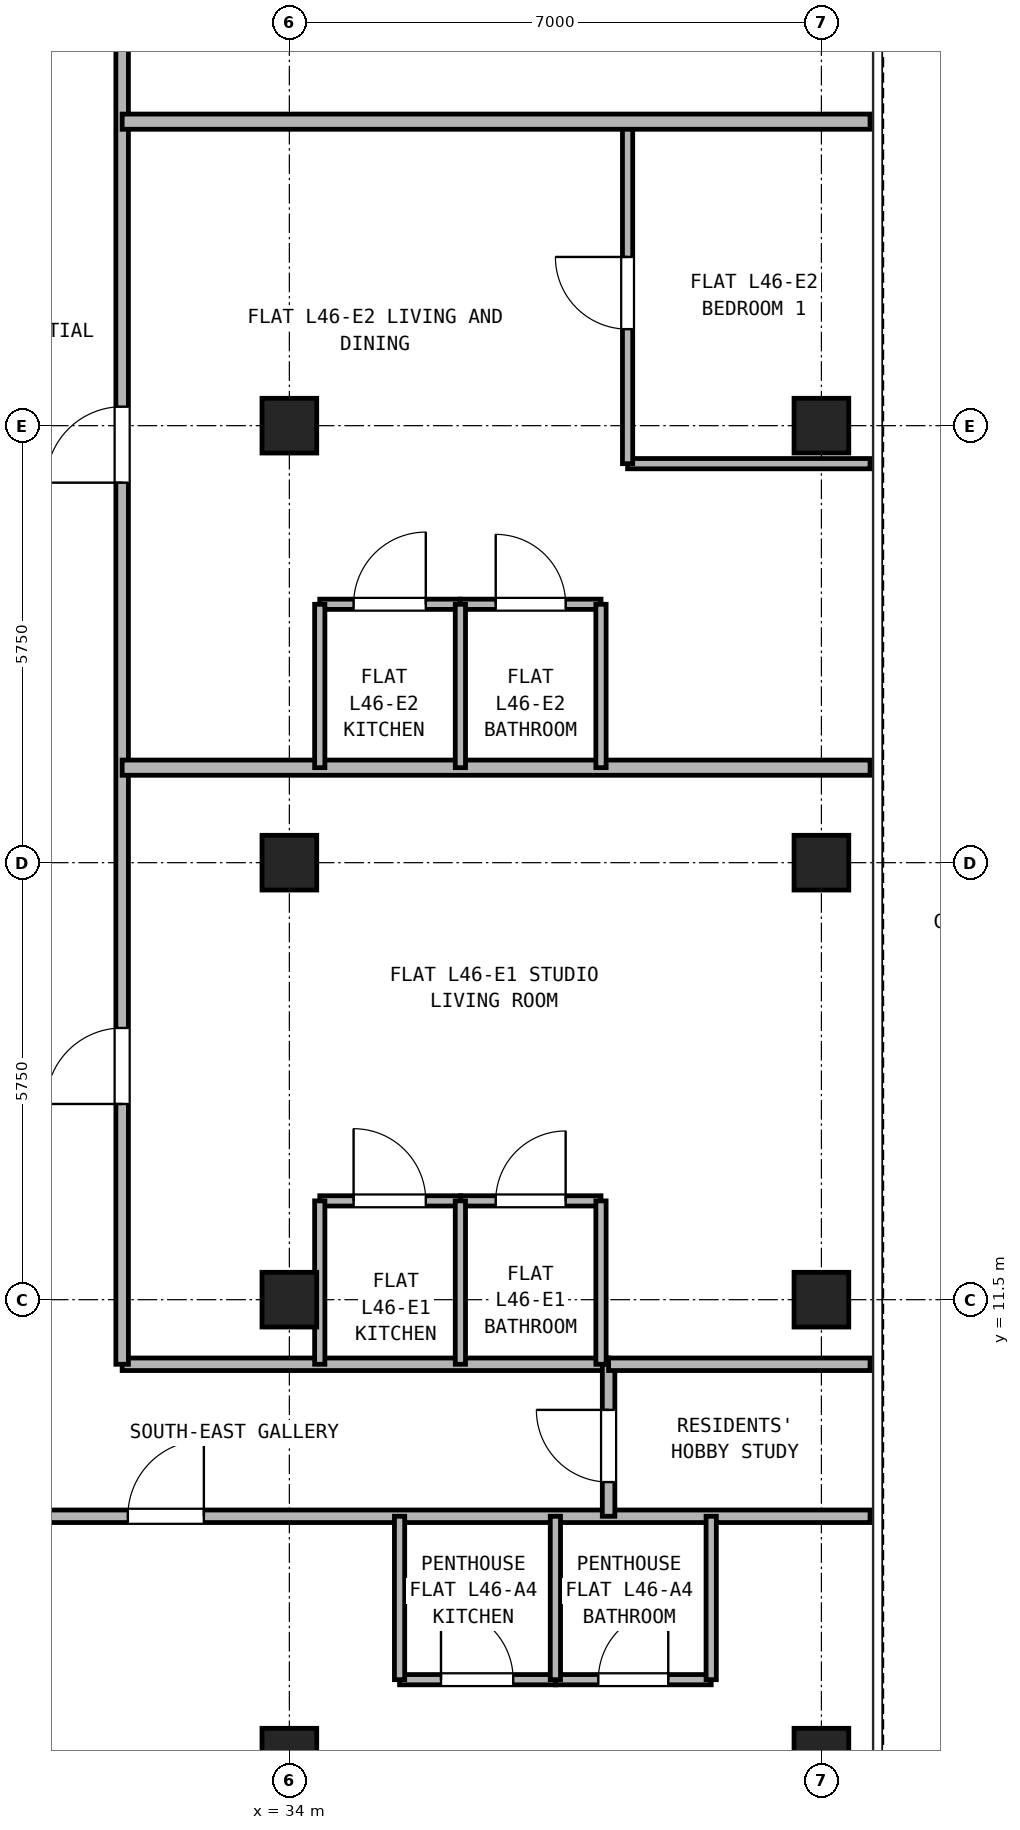
"""IFC4 building model, lengths in metres.
Left out: names, types, materials, properties, quantities, classifications, styles, units other than length and angle.
Written with IfcOpenShell. Run it as: python <this file> out.ifc"""

import sys

from ifc_helpers import new_model, si_unit, direction, frame, frame_2d, origin, origin_2d, place, context, subcontext, project, spatial, rectangle, hollow_rectangle, extrude, source, transform, mapped, element, fill, save


model = new_model("IFC4")
c1 = context("Model", 3, precision=1e-05, world=origin(), true_north=direction((0.0, 1.0)))
c2 = subcontext(c1, "Body", "Model", "MODEL_VIEW")
j1 = project(units=[si_unit("LENGTHUNIT", "METRE"), si_unit("PLANEANGLEUNIT", "RADIAN")], contexts=[c1])
p1 = place(None, origin())
s1 = spatial("IfcSite", under=j1, at=p1, CompositionType="ELEMENT")
p2 = place(p1, origin())
s2 = spatial("IfcBuilding", under=s1, at=p2, CompositionType="ELEMENT")
p3 = place(p2, frame((0.0, 0.0, 165.7)))
s3 = spatial("IfcBuildingStorey", under=s2, at=p3, CompositionType="ELEMENT", Elevation=165.7)
m1 = source(origin(), c2, "Body", "SweptSolid", [
    extrude(hollow_rectangle(XDim=0.72, YDim=0.72, WallThickness=0.04, at=origin_2d()), origin(), (0.0, 0.0, 1.0), 2.95),
])
for number, where, z_axis, x_axis in (
    (1, (41.0, 5.5, 0.0), (0.0, 0.0, 1.0), (1.0, 0.0, 0.0)),
    (2, (41.0, 11.5, 0.0), (0.0, 0.0, 1.0), (1.0, 0.0, 0.0)),
    (3, (41.0, 17.25, 0.0), (0.0, 0.0, 1.0), (1.0, 0.0, 0.0)),
    (4, (41.0, 23.0, 0.0), (0.0, 0.0, 1.0), (1.0, 0.0, 0.0)),
    (5, (34.0, 5.5, 0.0), (0.0, 0.0, 1.0), (1.0, 0.0, 0.0)),
    (6, (34.0, 11.5, 0.0), (0.0, 0.0, 1.0), (1.0, 0.0, 0.0)),
    (7, (34.0, 17.25, 0.0), (0.0, 0.0, 1.0), (1.0, 0.0, 0.0)),
    (8, (34.0, 23.0, 0.0), (0.0, 0.0, 1.0), (1.0, 0.0, 0.0)),
):
    element("IfcColumn", number, at=place(p3, frame(where, z_axis=z_axis, x_axis=x_axis)), inside=s3, PredefinedType="COLUMN", context=c2, shape_type="MappedRepresentation", body=[
        mapped(m1, transform((0.0, 0.0, 0.0), x_axis=(1.0, 0.0, 0.0), y_axis=(0.0, 1.0, 0.0), z_axis=(0.0, 0.0, 1.0), scale=1.0)),
    ])
p4 = place(p3, frame((0.16, 8.65, 0.0), z_axis=(0.0, 0.0, 1.0), x_axis=(1.0, 0.0, 0.0)))
e9 = element("IfcWall", 9, at=p4, inside=s3, PredefinedType="PARTITIONING", context=c2, shape_type="SweptSolid", body=[
    extrude(rectangle(XDim=41.48, YDim=0.165, at=frame_2d((20.74, 0.0))), origin(), (0.0, 0.0, 1.0), 2.583),
])
p5 = place(p4, frame((9.39, 0.0, 0.0)))
e10 = element("IfcOpeningElement", 10, at=p5, cuts=e9, PredefinedType="OPENING", context=c2, shape_type="SweptSolid", body=[
    extrude(rectangle(XDim=1.0, YDim=2.15, at=frame_2d((0.5, 1.075))), frame((0.0, 0.093, 0.0), z_axis=(0.0, -1.0, 0.0), x_axis=(1.0, 0.0, 0.0)), (0.0, 0.0, 1.0), 0.185),
])
p6 = place(p4, frame((18.965, 0.0, 0.0)))
e11 = element("IfcOpeningElement", 11, at=p6, cuts=e9, PredefinedType="OPENING", context=c2, shape_type="SweptSolid", body=[
    extrude(rectangle(XDim=1.0, YDim=2.15, at=frame_2d((0.5, 1.075))), frame((0.0, 0.093, 0.0), z_axis=(0.0, -1.0, 0.0), x_axis=(1.0, 0.0, 0.0)), (0.0, 0.0, 1.0), 0.185),
])
p7 = place(p4, frame((26.34, 0.0, 0.0)))
e12 = element("IfcOpeningElement", 12, at=p7, cuts=e9, PredefinedType="OPENING", context=c2, shape_type="SweptSolid", body=[
    extrude(rectangle(XDim=1.0, YDim=2.15, at=frame_2d((0.5, 1.075))), frame((0.0, 0.093, 0.0), z_axis=(0.0, -1.0, 0.0), x_axis=(1.0, 0.0, 0.0)), (0.0, 0.0, 1.0), 0.185),
])
p8 = place(p4, frame((31.715, 0.0, 0.0)))
e13 = element("IfcOpeningElement", 13, at=p8, cuts=e9, PredefinedType="OPENING", context=c2, shape_type="SweptSolid", body=[
    extrude(rectangle(XDim=1.0, YDim=2.15, at=frame_2d((0.5, 1.075))), frame((0.0, 0.093, 0.0), z_axis=(0.0, -1.0, 0.0), x_axis=(1.0, 0.0, 0.0)), (0.0, 0.0, 1.0), 0.185),
])
p9 = place(p3, frame((31.8, 10.65, 0.0), z_axis=(0.0, 0.0, 1.0), x_axis=(1.0, 0.0, 0.0)))
e14 = element("IfcWall", 14, at=p9, inside=s3, PredefinedType="PARTITIONING", context=c2, shape_type="SweptSolid", body=[
    extrude(rectangle(XDim=6.4, YDim=0.165, at=frame_2d((3.2, 0.0))), origin(), (0.0, 0.0, 1.0), 2.95),
])
p10 = place(p3, frame((38.2, 8.65, 0.0), z_axis=(0.0, 0.0, 1.0), x_axis=(0.0, 1.0, 0.0)))
e15 = element("IfcWall", 15, at=p10, inside=s3, PredefinedType="PARTITIONING", context=c2, shape_type="SweptSolid", body=[
    extrude(rectangle(XDim=2.0, YDim=0.165, at=frame_2d((1.0, 0.0))), origin(), (0.0, 0.0, 1.0), 2.95),
])
p11 = place(p10, frame((0.45, 0.0, 0.0)))
e16 = element("IfcOpeningElement", 16, at=p11, cuts=e15, PredefinedType="OPENING", context=c2, shape_type="SweptSolid", body=[
    extrude(rectangle(XDim=0.95, YDim=2.15, at=frame_2d((0.475, 1.075))), frame((0.0, 0.093, 0.0), z_axis=(0.0, -1.0, 0.0), x_axis=(1.0, 0.0, 0.0)), (0.0, 0.0, 1.0), 0.185),
])
p12 = place(p3, frame((31.8, 10.65, 0.0), z_axis=(0.0, 0.0, 1.0), x_axis=(0.0, 1.0, 0.0)))
e17 = element("IfcWall", 17, at=p12, inside=s3, PredefinedType="PARTITIONING", context=c2, shape_type="SweptSolid", body=[
    extrude(rectangle(XDim=24.49, YDim=0.165, at=frame_2d((12.245, 0.0))), origin(), (0.0, 0.0, 1.0), 2.95),
])
p13 = place(p12, frame((3.425, 0.0, 0.0)))
e18 = element("IfcOpeningElement", 18, at=p13, cuts=e17, PredefinedType="OPENING", context=c2, shape_type="SweptSolid", body=[
    extrude(rectangle(XDim=1.0, YDim=2.15, at=frame_2d((0.5, 1.075))), frame((0.0, 0.093, 0.0), z_axis=(0.0, -1.0, 0.0), x_axis=(1.0, 0.0, 0.0)), (0.0, 0.0, 1.0), 0.185),
])
p14 = place(p12, frame((11.6, 0.0, 0.0)))
e19 = element("IfcOpeningElement", 19, at=p14, cuts=e17, PredefinedType="OPENING", context=c2, shape_type="SweptSolid", body=[
    extrude(rectangle(XDim=1.0, YDim=2.15, at=frame_2d((0.5, 1.075))), frame((0.0, 0.093, 0.0), z_axis=(0.0, -1.0, 0.0), x_axis=(1.0, 0.0, 0.0)), (0.0, 0.0, 1.0), 0.185),
])
p15 = place(p12, frame((18.25, 0.0, 0.0)))
e20 = element("IfcOpeningElement", 20, at=p15, cuts=e17, PredefinedType="OPENING", context=c2, shape_type="SweptSolid", body=[
    extrude(rectangle(XDim=1.0, YDim=2.15, at=frame_2d((0.5, 1.075))), frame((0.0, 0.093, 0.0), z_axis=(0.0, -1.0, 0.0), x_axis=(1.0, 0.0, 0.0)), (0.0, 0.0, 1.0), 0.185),
])
p16 = place(p3, frame((35.45, 6.5, 0.0), z_axis=(0.0, 0.0, 1.0), x_axis=(1.0, 0.0, 0.0)))
e21 = element("IfcWall", 21, at=p16, inside=s3, PredefinedType="PARTITIONING", context=c2, shape_type="SweptSolid", body=[
    extrude(rectangle(XDim=2.05, YDim=0.135, at=frame_2d((1.025, 0.0))), origin(), (0.0, 0.0, 1.0), 2.95),
])
p17 = place(p16, frame((0.545, 0.0, 0.0)))
e22 = element("IfcOpeningElement", 22, at=p17, cuts=e21, PredefinedType="OPENING", context=c2, shape_type="SweptSolid", body=[
    extrude(rectangle(XDim=0.95, YDim=2.15, at=frame_2d((0.475, 1.075))), frame((0.0, 0.077, 0.0), z_axis=(0.0, -1.0, 0.0), x_axis=(1.0, 0.0, 0.0)), (0.0, 0.0, 1.0), 0.155),
])
p18 = place(p3, frame((37.5, 6.5, 0.0), z_axis=(0.0, 0.0, 1.0), x_axis=(1.0, 0.0, 0.0)))
e23 = element("IfcWall", 23, at=p18, inside=s3, PredefinedType="PARTITIONING", context=c2, shape_type="SweptSolid", body=[
    extrude(rectangle(XDim=2.05, YDim=0.135, at=frame_2d((1.025, 0.0))), origin(), (0.0, 0.0, 1.0), 2.95),
])
p19 = place(p18, frame((0.565, 0.0, 0.0)))
e24 = element("IfcOpeningElement", 24, at=p19, cuts=e23, PredefinedType="OPENING", context=c2, shape_type="SweptSolid", body=[
    extrude(rectangle(XDim=0.92, YDim=2.1, at=frame_2d((0.46, 1.05))), frame((0.0, 0.077, 0.0), z_axis=(0.0, -1.0, 0.0), x_axis=(1.0, 0.0, 0.0)), (0.0, 0.0, 1.0), 0.155),
])
for number, where, z_axis, x_axis in (
    (25, (35.45, 6.5, 0.0), (0.0, 0.0, 1.0), (0.0, 1.0, 0.0)),
    (26, (37.5, 6.5, 0.0), (0.0, 0.0, 1.0), (0.0, 1.0, 0.0)),
    (27, (39.55, 6.5, 0.0), (0.0, 0.0, 1.0), (0.0, 1.0, 0.0)),
):
    element("IfcWall", number, at=place(p3, frame(where, z_axis=z_axis, x_axis=x_axis)), inside=s3, PredefinedType="PARTITIONING", context=c2, shape_type="SweptSolid", body=[
        extrude(rectangle(XDim=2.15, YDim=0.135, at=frame_2d((1.075, 0.0))), origin(), (0.0, 0.0, 1.0), 2.95),
    ])
p20 = place(p3, frame((38.2, 10.65, 0.0), z_axis=(0.0, 0.0, 1.0), x_axis=(1.0, 0.0, 0.0)))
e28 = element("IfcWall", 28, at=p20, inside=s3, PredefinedType="PARTITIONING", context=c2, shape_type="SweptSolid", body=[
    extrude(rectangle(XDim=3.44, YDim=0.165, at=frame_2d((1.72, 0.0))), origin(), (0.0, 0.0, 1.0), 2.95),
])
p21 = place(p3, frame((34.4, 12.8, 0.0), z_axis=(0.0, 0.0, 1.0), x_axis=(1.0, 0.0, 0.0)))
e29 = element("IfcWall", 29, at=p21, inside=s3, PredefinedType="PARTITIONING", context=c2, shape_type="SweptSolid", body=[
    extrude(rectangle(XDim=1.85, YDim=0.135, at=frame_2d((0.925, 0.0))), origin(), (0.0, 0.0, 1.0), 2.95),
])
p22 = place(p21, frame((0.445, 0.0, 0.0)))
e30 = element("IfcOpeningElement", 30, at=p22, cuts=e29, PredefinedType="OPENING", context=c2, shape_type="SweptSolid", body=[
    extrude(rectangle(XDim=0.95, YDim=2.15, at=frame_2d((0.475, 1.075))), frame((0.0, 0.077, 0.0), z_axis=(0.0, -1.0, 0.0), x_axis=(1.0, 0.0, 0.0)), (0.0, 0.0, 1.0), 0.155),
])
p23 = place(p3, frame((36.25, 12.8, 0.0), z_axis=(0.0, 0.0, 1.0), x_axis=(1.0, 0.0, 0.0)))
e31 = element("IfcWall", 31, at=p23, inside=s3, PredefinedType="PARTITIONING", context=c2, shape_type="SweptSolid", body=[
    extrude(rectangle(XDim=1.85, YDim=0.135, at=frame_2d((0.925, 0.0))), origin(), (0.0, 0.0, 1.0), 2.95),
])
p24 = place(p23, frame((0.465, 0.0, 0.0)))
e32 = element("IfcOpeningElement", 32, at=p24, cuts=e31, PredefinedType="OPENING", context=c2, shape_type="SweptSolid", body=[
    extrude(rectangle(XDim=0.92, YDim=2.1, at=frame_2d((0.46, 1.05))), frame((0.0, 0.077, 0.0), z_axis=(0.0, -1.0, 0.0), x_axis=(1.0, 0.0, 0.0)), (0.0, 0.0, 1.0), 0.155),
])
for number, where, z_axis, x_axis in (
    (33, (34.4, 10.65, 0.0), (0.0, 0.0, 1.0), (0.0, 1.0, 0.0)),
    (34, (36.25, 10.65, 0.0), (0.0, 0.0, 1.0), (0.0, 1.0, 0.0)),
    (35, (38.1, 10.65, 0.0), (0.0, 0.0, 1.0), (0.0, 1.0, 0.0)),
):
    element("IfcWall", number, at=place(p3, frame(where, z_axis=z_axis, x_axis=x_axis)), inside=s3, PredefinedType="PARTITIONING", context=c2, shape_type="SweptSolid", body=[
        extrude(rectangle(XDim=2.15, YDim=0.135, at=frame_2d((1.075, 0.0))), origin(), (0.0, 0.0, 1.0), 2.95),
    ])
p25 = place(p3, frame((31.8, 18.5, 0.0), z_axis=(0.0, 0.0, 1.0), x_axis=(1.0, 0.0, 0.0)))
e36 = element("IfcWall", 36, at=p25, inside=s3, PredefinedType="PARTITIONING", context=c2, shape_type="SweptSolid", body=[
    extrude(rectangle(XDim=9.84, YDim=0.2, at=frame_2d((4.92, 0.0))), origin(), (0.0, 0.0, 1.0), 2.95),
])
p26 = place(p3, frame((34.4, 20.65, 0.0), z_axis=(0.0, 0.0, 1.0), x_axis=(1.0, 0.0, 0.0)))
e37 = element("IfcWall", 37, at=p26, inside=s3, PredefinedType="PARTITIONING", context=c2, shape_type="SweptSolid", body=[
    extrude(rectangle(XDim=1.85, YDim=0.135, at=frame_2d((0.925, 0.0))), origin(), (0.0, 0.0, 1.0), 2.95),
])
p27 = place(p26, frame((0.445, 0.0, 0.0)))
e38 = element("IfcOpeningElement", 38, at=p27, cuts=e37, PredefinedType="OPENING", context=c2, shape_type="SweptSolid", body=[
    extrude(rectangle(XDim=0.95, YDim=2.15, at=frame_2d((0.475, 1.075))), frame((0.0, 0.077, 0.0), z_axis=(0.0, -1.0, 0.0), x_axis=(1.0, 0.0, 0.0)), (0.0, 0.0, 1.0), 0.155),
])
p28 = place(p3, frame((36.25, 20.65, 0.0), z_axis=(0.0, 0.0, 1.0), x_axis=(1.0, 0.0, 0.0)))
e39 = element("IfcWall", 39, at=p28, inside=s3, PredefinedType="PARTITIONING", context=c2, shape_type="SweptSolid", body=[
    extrude(rectangle(XDim=1.85, YDim=0.135, at=frame_2d((0.925, 0.0))), origin(), (0.0, 0.0, 1.0), 2.95),
])
p29 = place(p28, frame((0.465, 0.0, 0.0)))
e40 = element("IfcOpeningElement", 40, at=p29, cuts=e39, PredefinedType="OPENING", context=c2, shape_type="SweptSolid", body=[
    extrude(rectangle(XDim=0.92, YDim=2.1, at=frame_2d((0.46, 1.05))), frame((0.0, 0.077, 0.0), z_axis=(0.0, -1.0, 0.0), x_axis=(1.0, 0.0, 0.0)), (0.0, 0.0, 1.0), 0.155),
])
for number, where, z_axis, x_axis in (
    (41, (34.4, 18.5, 0.0), (0.0, 0.0, 1.0), (0.0, 1.0, 0.0)),
    (42, (36.25, 18.5, 0.0), (0.0, 0.0, 1.0), (0.0, 1.0, 0.0)),
    (43, (38.1, 18.5, 0.0), (0.0, 0.0, 1.0), (0.0, 1.0, 0.0)),
):
    element("IfcWall", number, at=place(p3, frame(where, z_axis=z_axis, x_axis=x_axis)), inside=s3, PredefinedType="PARTITIONING", context=c2, shape_type="SweptSolid", body=[
        extrude(rectangle(XDim=2.15, YDim=0.135, at=frame_2d((1.075, 0.0))), origin(), (0.0, 0.0, 1.0), 2.95),
    ])
p30 = place(p3, frame((38.45, 22.5, 0.0), z_axis=(0.0, 0.0, 1.0), x_axis=(1.0, 0.0, 0.0)))
e44 = element("IfcWall", 44, at=p30, inside=s3, PredefinedType="PARTITIONING", context=c2, shape_type="SweptSolid", body=[
    extrude(rectangle(XDim=3.19, YDim=0.135, at=frame_2d((1.595, 0.0))), origin(), (0.0, 0.0, 1.0), 2.95),
])
p31 = place(p3, frame((38.45, 22.5, 0.0), z_axis=(0.0, 0.0, 1.0), x_axis=(0.0, 1.0, 0.0)))
e45 = element("IfcWall", 45, at=p31, inside=s3, PredefinedType="PARTITIONING", context=c2, shape_type="SweptSolid", body=[
    extrude(rectangle(XDim=4.5, YDim=0.135, at=frame_2d((2.25, 0.0))), origin(), (0.0, 0.0, 1.0), 2.95),
])
p32 = place(p31, frame((1.77, 0.0, 0.0)))
e46 = element("IfcOpeningElement", 46, at=p32, cuts=e45, PredefinedType="OPENING", context=c2, shape_type="SweptSolid", body=[
    extrude(rectangle(XDim=0.95, YDim=2.15, at=frame_2d((0.475, 1.075))), frame((0.0, 0.077, 0.0), z_axis=(0.0, -1.0, 0.0), x_axis=(1.0, 0.0, 0.0)), (0.0, 0.0, 1.0), 0.155),
])
p33 = place(p3, frame((31.8, 27.0, 0.0), z_axis=(0.0, 0.0, 1.0), x_axis=(1.0, 0.0, 0.0)))
e47 = element("IfcWall", 47, at=p33, inside=s3, PredefinedType="PARTITIONING", context=c2, shape_type="SweptSolid", body=[
    extrude(rectangle(XDim=9.84, YDim=0.2, at=frame_2d((4.92, 0.0))), origin(), (0.0, 0.0, 1.0), 2.95),
])
p34 = place(p17, origin())
e48 = element("IfcDoor", 48, at=p34, inside=s3, OperationType="SINGLE_SWING_LEFT", PredefinedType="DOOR", context=c2, shape_type="SweptSolid", body=[
    extrude(rectangle(XDim=0.95, YDim=2.15, at=frame_2d((0.475, 1.075))), frame((0.0, 0.025, 0.0), z_axis=(0.0, -1.0, 0.0), x_axis=(1.0, 0.0, 0.0)), (0.0, 0.0, 1.0), 0.05),
])
fill(e22, e48)
p35 = place(p19, origin())
e49 = element("IfcDoor", 49, at=p35, inside=s3, OperationType="SINGLE_SWING_RIGHT", PredefinedType="DOOR", context=c2, shape_type="SweptSolid", body=[
    extrude(rectangle(XDim=0.92, YDim=2.1, at=frame_2d((0.46, 1.05))), frame((0.0, 0.025, 0.0), z_axis=(0.0, -1.0, 0.0), x_axis=(1.0, 0.0, 0.0)), (0.0, 0.0, 1.0), 0.05),
])
fill(e24, e49)
p36 = place(p8, frame((1.0, 0.0, 0.0), z_axis=(0.0, 0.0, 1.0), x_axis=(-1.0, 0.0, 0.0)))
e50 = element("IfcDoor", 50, at=p36, inside=s3, OperationType="SINGLE_SWING_RIGHT", PredefinedType="DOOR", context=c2, shape_type="SweptSolid", body=[
    extrude(rectangle(XDim=1.0, YDim=2.15, at=frame_2d((0.5, 1.075))), frame((0.0, 0.025, 0.0), z_axis=(0.0, -1.0, 0.0), x_axis=(1.0, 0.0, 0.0)), (0.0, 0.0, 1.0), 0.05),
])
fill(e13, e50)
p37 = place(p11, origin())
e51 = element("IfcDoor", 51, at=p37, inside=s3, OperationType="SINGLE_SWING_RIGHT", PredefinedType="DOOR", context=c2, shape_type="SweptSolid", body=[
    extrude(rectangle(XDim=0.95, YDim=2.15, at=frame_2d((0.475, 1.075))), frame((0.0, 0.025, 0.0), z_axis=(0.0, -1.0, 0.0), x_axis=(1.0, 0.0, 0.0)), (0.0, 0.0, 1.0), 0.05),
])
fill(e16, e51)
p38 = place(p22, origin())
e52 = element("IfcDoor", 52, at=p38, inside=s3, OperationType="SINGLE_SWING_LEFT", PredefinedType="DOOR", context=c2, shape_type="SweptSolid", body=[
    extrude(rectangle(XDim=0.95, YDim=2.15, at=frame_2d((0.475, 1.075))), frame((0.0, 0.025, 0.0), z_axis=(0.0, -1.0, 0.0), x_axis=(1.0, 0.0, 0.0)), (0.0, 0.0, 1.0), 0.05),
])
fill(e30, e52)
p39 = place(p24, origin())
e53 = element("IfcDoor", 53, at=p39, inside=s3, OperationType="SINGLE_SWING_RIGHT", PredefinedType="DOOR", context=c2, shape_type="SweptSolid", body=[
    extrude(rectangle(XDim=0.92, YDim=2.1, at=frame_2d((0.46, 1.05))), frame((0.0, 0.025, 0.0), z_axis=(0.0, -1.0, 0.0), x_axis=(1.0, 0.0, 0.0)), (0.0, 0.0, 1.0), 0.05),
])
fill(e32, e53)
p40 = place(p13, frame((1.0, 0.0, 0.0), z_axis=(0.0, 0.0, 1.0), x_axis=(-1.0, 0.0, 0.0)))
e54 = element("IfcDoor", 54, at=p40, inside=s3, OperationType="SINGLE_SWING_LEFT", PredefinedType="DOOR", context=c2, shape_type="SweptSolid", body=[
    extrude(rectangle(XDim=1.0, YDim=2.15, at=frame_2d((0.5, 1.075))), frame((0.0, 0.025, 0.0), z_axis=(0.0, -1.0, 0.0), x_axis=(1.0, 0.0, 0.0)), (0.0, 0.0, 1.0), 0.05),
])
fill(e18, e54)
p41 = place(p27, origin())
e55 = element("IfcDoor", 55, at=p41, inside=s3, OperationType="SINGLE_SWING_RIGHT", PredefinedType="DOOR", context=c2, shape_type="SweptSolid", body=[
    extrude(rectangle(XDim=0.95, YDim=2.15, at=frame_2d((0.475, 1.075))), frame((0.0, 0.025, 0.0), z_axis=(0.0, -1.0, 0.0), x_axis=(1.0, 0.0, 0.0)), (0.0, 0.0, 1.0), 0.05),
])
fill(e38, e55)
p42 = place(p29, origin())
e56 = element("IfcDoor", 56, at=p42, inside=s3, OperationType="SINGLE_SWING_LEFT", PredefinedType="DOOR", context=c2, shape_type="SweptSolid", body=[
    extrude(rectangle(XDim=0.92, YDim=2.1, at=frame_2d((0.46, 1.05))), frame((0.0, 0.025, 0.0), z_axis=(0.0, -1.0, 0.0), x_axis=(1.0, 0.0, 0.0)), (0.0, 0.0, 1.0), 0.05),
])
fill(e40, e56)
p43 = place(p32, frame((0.95, 0.0, 0.0), z_axis=(0.0, 0.0, 1.0), x_axis=(-1.0, 0.0, 0.0)))
e57 = element("IfcDoor", 57, at=p43, inside=s3, OperationType="SINGLE_SWING_RIGHT", PredefinedType="DOOR", context=c2, shape_type="SweptSolid", body=[
    extrude(rectangle(XDim=0.95, YDim=2.15, at=frame_2d((0.475, 1.075))), frame((0.0, 0.025, 0.0), z_axis=(0.0, -1.0, 0.0), x_axis=(1.0, 0.0, 0.0)), (0.0, 0.0, 1.0), 0.05),
])
fill(e46, e57)
p44 = place(p14, frame((1.0, 0.0, 0.0), z_axis=(0.0, 0.0, 1.0), x_axis=(-1.0, 0.0, 0.0)))
e58 = element("IfcDoor", 58, at=p44, inside=s3, OperationType="SINGLE_SWING_LEFT", PredefinedType="DOOR", context=c2, shape_type="SweptSolid", body=[
    extrude(rectangle(XDim=1.0, YDim=2.15, at=frame_2d((0.5, 1.075))), frame((0.0, 0.025, 0.0), z_axis=(0.0, -1.0, 0.0), x_axis=(1.0, 0.0, 0.0)), (0.0, 0.0, 1.0), 0.05),
])
fill(e19, e58)
save(model, sys.argv[1])
